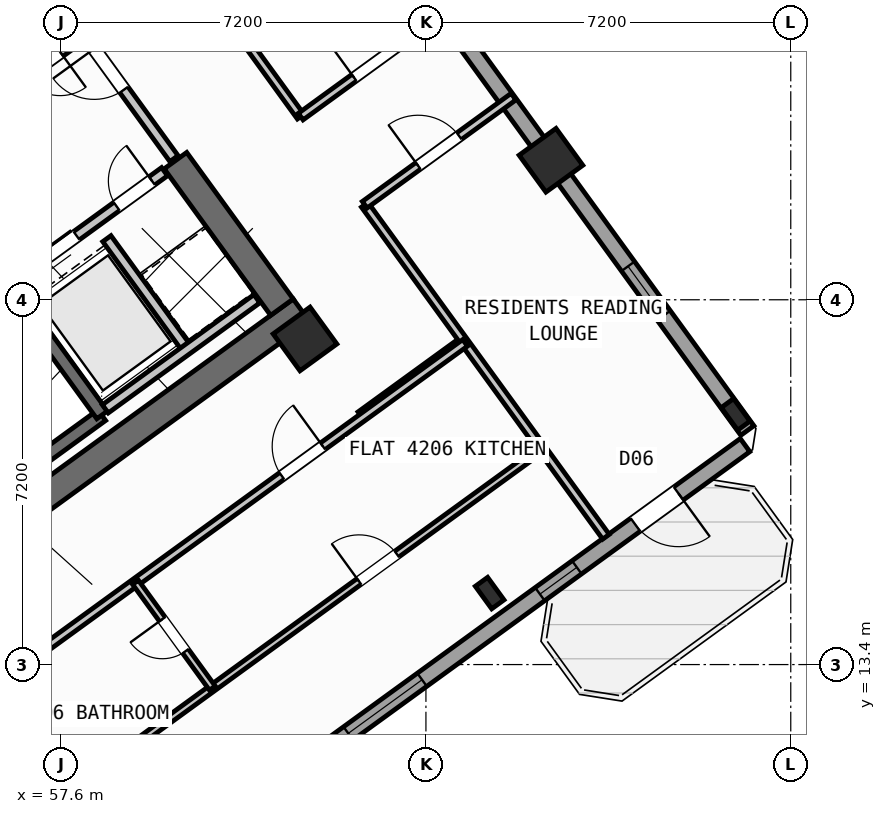
"""IFC4 building model, lengths in metres.
Left out: names, types, materials, properties, quantities, classifications, styles, units other than length and angle.
Written with IfcOpenShell. Run it as: python <this file> out.ifc"""

import sys

from ifc_helpers import new_model, si_unit, direction, frame, frame_2d, origin, origin_2d, place, context, subcontext, project, spatial, rectangle, hollow_rectangle, i_section, extrude, source, transform, mapped, element, fill, save


model = new_model("IFC4")
c1 = context("Model", 3, precision=1e-05, world=origin(), true_north=direction((0.0, 1.0)))
c2 = subcontext(c1, "Body", "Model", "MODEL_VIEW")
j1 = project(units=[si_unit("LENGTHUNIT", "METRE"), si_unit("PLANEANGLEUNIT", "RADIAN")], contexts=[c1])
p1 = place(None, origin())
s1 = spatial("IfcSite", under=j1, at=p1, CompositionType="ELEMENT")
p2 = place(p1, origin())
s2 = spatial("IfcBuilding", under=s1, at=p2, CompositionType="ELEMENT")
p3 = place(p2, frame((0.0, 0.0, 165.9)))
s3 = spatial("IfcBuildingStorey", under=s2, at=p3, CompositionType="ELEMENT", Elevation=165.9)
p4 = place(p3, frame((52.359, 13.14, 0.0), z_axis=(0.0, 0.0, 1.0), x_axis=(0.809014896919, 0.587788139183, 0.0)))
e1 = element("IfcWall", 1, at=p4, inside=s3, PredefinedType="SHEAR", context=c2, shape_type="SweptSolid", body=[
    extrude(rectangle(XDim=12.34, YDim=0.55, at=frame_2d((6.17, 0.0))), origin(), (0.0, 0.0, 1.0), 3.32),
])
p5 = place(p3, frame((61.958, 20.454, 0.0), z_axis=(0.0, 0.0, 1.0), x_axis=(-0.587802113096, 0.809004744015, 0.0)))
e2 = element("IfcWall", 2, at=p5, inside=s3, PredefinedType="SHEAR", context=c2, shape_type="SweptSolid", body=[
    extrude(rectangle(XDim=3.575, YDim=0.55, at=frame_2d((1.788, 0.0))), origin(), (0.0, 0.0, 1.0), 3.32),
])
m1 = source(origin(), c2, "Body", "SweptSolid", [
    extrude(i_section(OverallWidth=0.3, OverallDepth=0.55, WebThickness=0.015, FlangeThickness=0.029, at=origin_2d()), origin(), (0.0, 0.0, 1.0), 3.6),
])
p6 = place(p3, frame((66.058, 14.811, 0.0), z_axis=(0.0, 0.0, 1.0), x_axis=(0.809016994375, 0.587785252292, 0.0)))
e3 = element("IfcColumn", 3, at=p6, inside=s3, PredefinedType="COLUMN", context=c2, shape_type="MappedRepresentation", body=[
    mapped(m1, transform((0.0, 0.0, 0.0), scale=1.0)),
])
m2 = source(origin(), c2, "Body", "SweptSolid", [
    extrude(hollow_rectangle(XDim=0.9, YDim=0.9, WallThickness=0.036, at=origin_2d()), origin(), (0.0, 0.0, 1.0), 3.6),
])
p7 = place(p3, frame((62.414, 19.827, 0.0), z_axis=(0.0, 0.0, 1.0), x_axis=(0.809016994375, 0.587785252292, 0.0)))
e4 = element("IfcColumn", 4, at=p7, inside=s3, PredefinedType="COLUMN", context=c2, shape_type="MappedRepresentation", body=[
    mapped(m2, transform((0.0, 0.0, 0.0), scale=1.0)),
])
p8 = place(p3, frame((70.912, 18.338, 0.0), z_axis=(0.0, 0.0, 1.0), x_axis=(0.809016994375, 0.587785252292, 0.0)))
e5 = element("IfcColumn", 5, at=p8, inside=s3, PredefinedType="COLUMN", context=c2, shape_type="MappedRepresentation", body=[
    mapped(m1, transform((0.0, 0.0, 0.0), scale=1.0)),
])
p9 = place(p3, frame((67.268, 23.354, 0.0), z_axis=(0.0, 0.0, 1.0), x_axis=(0.809016994375, 0.587785252292, 0.0)))
e6 = element("IfcColumn", 6, at=p9, inside=s3, PredefinedType="COLUMN", context=c2, shape_type="MappedRepresentation", body=[
    mapped(m2, transform((0.0, 0.0, 0.0), scale=1.0)),
])
p10 = place(p3, frame((43.938, 25.192, 0.0), z_axis=(0.0, 0.0, 1.0), x_axis=(0.809016324578, 0.587786174187, 0.0)))
e7 = element("IfcWall", 7, at=p10, inside=s3, PredefinedType="STANDARD", context=c2, shape_type="SweptSolid", body=[
    extrude(rectangle(XDim=17.587, YDim=0.32, at=frame_2d((8.794, 0.0))), origin(), (0.0, 0.0, 1.0), 3.32),
])
p11 = place(p10, frame((14.914, 0.0, 0.0)))
e8 = element("IfcOpeningElement", 8, at=p11, cuts=e7, PredefinedType="OPENING", context=c2, shape_type="SweptSolid", body=[
    extrude(rectangle(XDim=1.05, YDim=2.15, at=frame_2d((0.525, 1.075))), frame((0.0, 0.17, 0.0), z_axis=(0.0, -1.0, 0.0), x_axis=(1.0, 0.0, 0.0)), (0.0, 0.0, 1.0), 0.34),
])
p12 = place(p10, frame((2.144, 0.0, 0.8)))
e9 = element("IfcOpeningElement", 9, at=p12, cuts=e7, PredefinedType="OPENING", context=c2, shape_type="SweptSolid", body=[
    extrude(rectangle(XDim=2.1, YDim=1.55, at=frame_2d((1.05, 0.775))), frame((0.0, 0.17, 0.0), z_axis=(0.0, -1.0, 0.0), x_axis=(1.0, 0.0, 0.0)), (0.0, 0.0, 1.0), 0.34),
])
p13 = place(p10, frame((7.344, 0.0, 0.8)))
e10 = element("IfcOpeningElement", 10, at=p13, cuts=e7, PredefinedType="OPENING", context=c2, shape_type="SweptSolid", body=[
    extrude(rectangle(XDim=2.1, YDim=1.55, at=frame_2d((1.05, 0.775))), frame((0.0, 0.17, 0.0), z_axis=(0.0, -1.0, 0.0), x_axis=(1.0, 0.0, 0.0)), (0.0, 0.0, 1.0), 0.34),
])
p14 = place(p3, frame((58.455, 35.484, 0.0), z_axis=(0.0, 0.0, 1.0), x_axis=(0.587783625747, -0.809018176127, 0.0)))
e11 = element("IfcWall", 11, at=p14, inside=s3, PredefinedType="STANDARD", context=c2, shape_type="SweptSolid", body=[
    extrude(rectangle(XDim=21.587, YDim=0.32, at=frame_2d((10.794, 0.0))), origin(), (0.0, 0.0, 1.0), 2.795),
])
p15 = place(p14, frame((1.475, 0.0, 0.8)))
e12 = element("IfcOpeningElement", 12, at=p15, cuts=e11, PredefinedType="OPENING", context=c2, shape_type="SweptSolid", body=[
    extrude(rectangle(XDim=2.1, YDim=1.55, at=frame_2d((1.05, 0.775))), frame((0.0, 0.17, 0.0), z_axis=(0.0, -1.0, 0.0), x_axis=(1.0, 0.0, 0.0)), (0.0, 0.0, 1.0), 0.34),
])
p16 = place(p14, frame((5.13, 0.0, 0.85)))
e13 = element("IfcOpeningElement", 13, at=p16, cuts=e11, PredefinedType="OPENING", context=c2, shape_type="SweptSolid", body=[
    extrude(rectangle(XDim=1.5, YDim=1.5, at=frame_2d((0.75, 0.75))), frame((0.0, 0.17, 0.0), z_axis=(0.0, -1.0, 0.0), x_axis=(1.0, 0.0, 0.0)), (0.0, 0.0, 1.0), 0.34),
])
p17 = place(p14, frame((8.929, 0.0, 0.85)))
e14 = element("IfcOpeningElement", 14, at=p17, cuts=e11, PredefinedType="OPENING", context=c2, shape_type="SweptSolid", body=[
    extrude(rectangle(XDim=1.5, YDim=1.5, at=frame_2d((0.75, 0.75))), frame((0.0, 0.17, 0.0), z_axis=(0.0, -1.0, 0.0), x_axis=(1.0, 0.0, 0.0)), (0.0, 0.0, 1.0), 0.34),
])
p18 = place(p14, frame((17.581, 0.0, 0.95)))
e15 = element("IfcOpeningElement", 15, at=p18, cuts=e11, PredefinedType="OPENING", context=c2, shape_type="SweptSolid", body=[
    extrude(rectangle(XDim=1.2, YDim=1.4, at=frame_2d((0.6, 0.7))), frame((0.0, 0.17, 0.0), z_axis=(0.0, -1.0, 0.0), x_axis=(1.0, 0.0, 0.0)), (0.0, 0.0, 1.0), 0.34),
])
p19 = place(p3, frame((71.098, 17.731, 0.0), z_axis=(0.0, 0.0, 1.0), x_axis=(-0.809021120468, -0.587779573171, 0.0)))
e16 = element("IfcWall", 16, at=p19, inside=s3, PredefinedType="STANDARD", context=c2, shape_type="SweptSolid", body=[
    extrude(rectangle(XDim=17.588, YDim=0.32, at=frame_2d((8.794, 0.0))), origin(), (0.0, 0.0, 1.0), 3.32),
])
p20 = place(p19, frame((1.624, 0.0, 0.0)))
e17 = element("IfcOpeningElement", 17, at=p20, cuts=e16, PredefinedType="OPENING", context=c2, shape_type="SweptSolid", body=[
    extrude(rectangle(XDim=1.05, YDim=2.15, at=frame_2d((0.525, 1.075))), frame((0.0, 0.17, 0.0), z_axis=(0.0, -1.0, 0.0), x_axis=(1.0, 0.0, 0.0)), (0.0, 0.0, 1.0), 0.34),
])
p21 = place(p19, frame((4.104, 0.0, 1.0)))
e18 = element("IfcOpeningElement", 18, at=p21, cuts=e16, PredefinedType="OPENING", context=c2, shape_type="SweptSolid", body=[
    extrude(rectangle(XDim=0.9, YDim=1.25, at=frame_2d((0.45, 0.625))), frame((0.0, 0.17, 0.0), z_axis=(0.0, -1.0, 0.0), x_axis=(1.0, 0.0, 0.0)), (0.0, 0.0, 1.0), 0.34),
])
p22 = place(p19, frame((7.879, 0.0, 0.85)))
e19 = element("IfcOpeningElement", 19, at=p22, cuts=e16, PredefinedType="OPENING", context=c2, shape_type="SweptSolid", body=[
    extrude(rectangle(XDim=1.8, YDim=1.5, at=frame_2d((0.9, 0.75))), frame((0.0, 0.17, 0.0), z_axis=(0.0, -1.0, 0.0), x_axis=(1.0, 0.0, 0.0)), (0.0, 0.0, 1.0), 0.34),
])
p23 = place(p19, frame((12.849, 0.0, 0.85)))
e20 = element("IfcOpeningElement", 20, at=p23, cuts=e16, PredefinedType="OPENING", context=c2, shape_type="SweptSolid", body=[
    extrude(rectangle(XDim=1.8, YDim=1.5, at=frame_2d((0.9, 0.75))), frame((0.0, 0.17, 0.0), z_axis=(0.0, -1.0, 0.0), x_axis=(1.0, 0.0, 0.0)), (0.0, 0.0, 1.0), 0.34),
])
p24 = place(p3, frame((52.472, 14.013, 0.0), z_axis=(0.0, 0.0, 1.0), x_axis=(0.809028366311, 0.587769599847, 0.0)))
e21 = element("IfcWall", 21, at=p24, inside=s3, PredefinedType="SHEAR", context=c2, shape_type="SweptSolid", body=[
    extrude(rectangle(XDim=7.33, YDim=0.26, at=frame_2d((3.665, 0.0))), origin(), (0.0, 0.0, 1.0), 3.32),
])
p25 = place(p3, frame((58.41, 18.327, 0.0), z_axis=(0.0, 0.0, 1.0), x_axis=(-0.58776738483, 0.809029975545, 0.0)))
e22 = element("IfcWall", 22, at=p25, inside=s3, PredefinedType="SHEAR", context=c2, shape_type="SweptSolid", body=[
    extrude(rectangle(XDim=3.16, YDim=0.26, at=frame_2d((1.58, 0.0))), origin(), (0.0, 0.0, 1.0), 3.32),
])
p26 = place(p3, frame((56.553, 20.884, 0.0), z_axis=(0.0, 0.0, 1.0), x_axis=(0.809023564264, 0.58777620951, 0.0)))
e23 = element("IfcWall", 23, at=p26, inside=s3, PredefinedType="STANDARD", context=c2, shape_type="SweptSolid", body=[
    extrude(rectangle(XDim=3.818, YDim=0.2, at=frame_2d((1.909, 0.0))), origin(), (0.0, 0.0, 1.0), 3.31),
])
p27 = place(p26, frame((0.57, 0.0, 0.0)))
e24 = element("IfcOpeningElement", 24, at=p27, cuts=e23, PredefinedType="OPENING", context=c2, shape_type="SweptSolid", body=[
    extrude(rectangle(XDim=1.1, YDim=2.15, at=frame_2d((0.55, 1.075))), frame((0.0, 0.11, 0.0), z_axis=(0.0, -1.0, 0.0), x_axis=(1.0, 0.0, 0.0)), (0.0, 0.0, 1.0), 0.22),
])
p28 = place(p26, frame((2.65, 0.0, 0.0)))
e25 = element("IfcOpeningElement", 25, at=p28, cuts=e23, PredefinedType="OPENING", context=c2, shape_type="SweptSolid", body=[
    extrude(rectangle(XDim=0.86, YDim=2.05, at=frame_2d((0.43, 1.025))), frame((0.0, 0.11, 0.0), z_axis=(0.0, -1.0, 0.0), x_axis=(1.0, 0.0, 0.0)), (0.0, 0.0, 1.0), 0.22),
])
p29 = place(p3, frame((60.067, 19.655, 0.0), z_axis=(0.0, 0.0, 1.0), x_axis=(-0.587800520745, 0.809005900975, 0.0)))
e26 = element("IfcWall", 26, at=p29, inside=s3, PredefinedType="STANDARD", context=c2, shape_type="SweptSolid", body=[
    extrude(rectangle(XDim=2.66, YDim=0.2, at=frame_2d((1.33, 0.0))), origin(), (0.0, 0.0, 1.0), 3.31),
])
p30 = place(p3, frame((58.472, 18.447, 0.0), z_axis=(0.0, 0.0, 1.0), x_axis=(0.809018631237, 0.587782999339, 0.0)))
e27 = element("IfcWall", 27, at=p30, inside=s3, PredefinedType="STANDARD", context=c2, shape_type="SweptSolid", body=[
    extrude(rectangle(XDim=3.698, YDim=0.2, at=frame_2d((1.849, 0.0))), origin(), (0.0, 0.0, 1.0), 3.31),
])
p31 = place(p3, frame((53.425, 22.468, 0.0), z_axis=(0.0, 0.0, 1.0), x_axis=(0.809024377198, 0.587775090574, 0.0)))
e28 = element("IfcWall", 28, at=p31, inside=s3, PredefinedType="STANDARD", context=c2, shape_type="SweptSolid", body=[
    extrude(rectangle(XDim=5.418, YDim=0.2, at=frame_2d((2.709, 0.0))), origin(), (0.0, 0.0, 1.0), 3.31),
])
p32 = place(p31, frame((4.28, 0.0, 0.0)))
e29 = element("IfcOpeningElement", 29, at=p32, cuts=e28, PredefinedType="OPENING", context=c2, shape_type="SweptSolid", body=[
    extrude(rectangle(XDim=0.86, YDim=2.05, at=frame_2d((0.43, 1.025))), frame((0.0, 0.11, 0.0), z_axis=(0.0, -1.0, 0.0), x_axis=(1.0, 0.0, 0.0)), (0.0, 0.0, 1.0), 0.22),
])
p33 = place(p31, frame((1.45, 0.0, 0.0)))
e30 = element("IfcOpeningElement", 30, at=p33, cuts=e28, PredefinedType="OPENING", context=c2, shape_type="SweptSolid", body=[
    extrude(rectangle(XDim=0.86, YDim=2.05, at=frame_2d((0.43, 1.025))), frame((0.0, 0.11, 0.0), z_axis=(0.0, -1.0, 0.0), x_axis=(1.0, 0.0, 0.0)), (0.0, 0.0, 1.0), 0.22),
])
p34 = place(p3, frame((59.827, 23.386, 0.0), z_axis=(0.0, 0.0, 1.0), x_axis=(-0.587803840107, 0.809003489211, 0.0)))
e31 = element("IfcWall", 31, at=p34, inside=s3, PredefinedType="STANDARD", context=c2, shape_type="SweptSolid", body=[
    extrude(rectangle(XDim=2.96, YDim=0.2, at=frame_2d((1.48, 0.0))), origin(), (0.0, 0.0, 1.0), 3.31),
])
p35 = place(p34, frame((1.68, 0.0, 0.0)))
e32 = element("IfcOpeningElement", 32, at=p35, cuts=e31, PredefinedType="OPENING", context=c2, shape_type="SweptSolid", body=[
    extrude(rectangle(XDim=1.0, YDim=2.1, at=frame_2d((0.5, 1.05))), frame((0.0, 0.11, 0.0), z_axis=(0.0, -1.0, 0.0), x_axis=(1.0, 0.0, 0.0)), (0.0, 0.0, 1.0), 0.22),
])
p36 = place(p3, frame((63.507, 18.322, 0.0), z_axis=(0.0, 0.0, 1.0), x_axis=(0.809034604122, 0.587761013791, 0.0)))
e33 = element("IfcWall", 33, at=p36, inside=s3, PredefinedType="PARTITIONING", context=c2, shape_type="SweptSolid", body=[
    extrude(rectangle(XDim=2.51, YDim=0.16, at=frame_2d((1.255, 0.0))), origin(), (0.0, 0.0, 1.0), 3.31),
])
p37 = place(p3, frame((68.353, 15.922, 0.0), z_axis=(0.0, 0.0, 1.0), x_axis=(-0.58776839458, 0.809029241952, 0.0)))
e34 = element("IfcWall", 34, at=p37, inside=s3, PredefinedType="PARTITIONING", context=c2, shape_type="SweptSolid", body=[
    extrude(rectangle(XDim=8.1, YDim=0.16, at=frame_2d((4.05, 0.0))), origin(), (0.0, 0.0, 1.0), 3.31),
])
p38 = place(p3, frame((62.328, 24.215, 0.0), z_axis=(0.0, 0.0, 1.0), x_axis=(-0.587778600963, 0.809021826807, 0.0)))
e35 = element("IfcWall", 35, at=p38, inside=s3, PredefinedType="PARTITIONING", context=c2, shape_type="SweptSolid", body=[
    extrude(rectangle(XDim=11.45, YDim=0.16, at=frame_2d((5.725, 0.0))), origin(), (0.0, 0.0, 1.0), 3.31),
])
p39 = place(p3, frame((63.592, 22.475, 0.0), z_axis=(0.0, 0.0, 1.0), x_axis=(0.809035546126, 0.58775971715, 0.0)))
e36 = element("IfcWall", 36, at=p39, inside=s3, PredefinedType="PARTITIONING", context=c2, shape_type="SweptSolid", body=[
    extrude(rectangle(XDim=3.63, YDim=0.16, at=frame_2d((1.815, 0.0))), origin(), (0.0, 0.0, 1.0), 3.31),
])
p40 = place(p39, frame((1.305, 0.0, 0.0)))
e37 = element("IfcOpeningElement", 37, at=p40, cuts=e36, PredefinedType="OPENING", context=c2, shape_type="SweptSolid", body=[
    extrude(rectangle(XDim=1.0, YDim=2.1, at=frame_2d((0.5, 1.05))), frame((0.0, 0.09, 0.0), z_axis=(0.0, -1.0, 0.0), x_axis=(1.0, 0.0, 0.0)), (0.0, 0.0, 1.0), 0.18),
])
p41 = place(p3, frame((62.328, 24.215, 0.0), z_axis=(0.0, 0.0, 1.0), x_axis=(0.809003564202, 0.587803736896, 0.0)))
e38 = element("IfcWall", 38, at=p41, inside=s3, PredefinedType="PARTITIONING", context=c2, shape_type="SweptSolid", body=[
    extrude(rectangle(XDim=3.63, YDim=0.16, at=frame_2d((1.815, 0.0))), origin(), (0.0, 0.0, 1.0), 3.31),
])
p42 = place(p41, frame((1.305, 0.0, 0.0)))
e39 = element("IfcOpeningElement", 39, at=p42, cuts=e38, PredefinedType="OPENING", context=c2, shape_type="SweptSolid", body=[
    extrude(rectangle(XDim=1.0, YDim=2.1, at=frame_2d((0.5, 1.05))), frame((0.0, 0.09, 0.0), z_axis=(0.0, -1.0, 0.0), x_axis=(1.0, 0.0, 0.0)), (0.0, 0.0, 1.0), 0.18),
])
p43 = place(p3, frame((53.705, 11.126, 0.0), z_axis=(0.0, 0.0, 1.0), x_axis=(0.809014504436, 0.587788679384, 0.0)))
e40 = element("IfcWall", 40, at=p43, inside=s3, PredefinedType="PARTITIONING", context=c2, shape_type="SweptSolid", body=[
    extrude(rectangle(XDim=14.67, YDim=0.16, at=frame_2d((7.335, 0.0))), origin(), (0.0, 0.0, 1.0), 3.31),
])
p44 = place(p43, frame((10.2, 0.0, 0.0)))
e41 = element("IfcOpeningElement", 41, at=p44, cuts=e40, PredefinedType="OPENING", context=c2, shape_type="SweptSolid", body=[
    extrude(rectangle(XDim=1.0, YDim=2.1, at=frame_2d((0.5, 1.05))), frame((0.0, 0.09, 0.0), z_axis=(0.0, -1.0, 0.0), x_axis=(1.0, 0.0, 0.0)), (0.0, 0.0, 1.0), 0.18),
])
p45 = place(p3, frame((57.747, 7.586, 0.0), z_axis=(0.0, 0.0, 1.0), x_axis=(-0.587784893399, 0.809017255126, 0.0)))
e42 = element("IfcWall", 42, at=p45, inside=s3, PredefinedType="PARTITIONING", context=c2, shape_type="SweptSolid", body=[
    extrude(rectangle(XDim=5.48, YDim=0.16, at=frame_2d((2.74, 0.0))), origin(), (0.0, 0.0, 1.0), 3.31),
])
p46 = place(p3, frame((56.249, 9.785, 0.0), z_axis=(0.0, 0.0, 1.0), x_axis=(0.809011747655, 0.587792473715, 0.0)))
e43 = element("IfcWall", 43, at=p46, inside=s3, PredefinedType="PLUMBINGWALL", context=c2, shape_type="SweptSolid", body=[
    extrude(rectangle(XDim=13.4, YDim=0.14, at=frame_2d((6.7, 0.0))), origin(), (0.0, 0.0, 1.0), 3.31),
])
p47 = place(p46, frame((8.94, 0.0, 0.0)))
e44 = element("IfcOpeningElement", 44, at=p47, cuts=e43, PredefinedType="OPENING", context=c2, shape_type="SweptSolid", body=[
    extrude(rectangle(XDim=0.92, YDim=2.08, at=frame_2d((0.46, 1.04))), frame((0.0, 0.08, 0.0), z_axis=(0.0, -1.0, 0.0), x_axis=(1.0, 0.0, 0.0)), (0.0, 0.0, 1.0), 0.16),
])
p48 = place(p3, frame((60.585, 12.936, 0.0), z_axis=(0.0, 0.0, 1.0), x_axis=(-0.587772116736, 0.809026537752, 0.0)))
e45 = element("IfcWall", 45, at=p48, inside=s3, PredefinedType="PLUMBINGWALL", context=c2, shape_type="SweptSolid", body=[
    extrude(rectangle(XDim=2.58, YDim=0.14, at=frame_2d((1.29, 0.0))), origin(), (0.0, 0.0, 1.0), 3.31),
])
p49 = place(p48, frame((0.9, 0.0, 0.0)))
e46 = element("IfcOpeningElement", 46, at=p49, cuts=e45, PredefinedType="OPENING", context=c2, shape_type="SweptSolid", body=[
    extrude(rectangle(XDim=0.78, YDim=2.05, at=frame_2d((0.39, 1.025))), frame((0.0, 0.08, 0.0), z_axis=(0.0, -1.0, 0.0), x_axis=(1.0, 0.0, 0.0)), (0.0, 0.0, 1.0), 0.16),
])
m3 = source(origin(), c2, "Body", "SweptSolid", [
    extrude(rectangle(XDim=1.05, YDim=2.15, at=frame_2d((0.525, 1.075))), frame((0.0, 0.025, 0.0), z_axis=(0.0, -1.0, 0.0), x_axis=(1.0, 0.0, 0.0)), (0.0, 0.0, 1.0), 0.05),
])
p50 = place(p20, origin())
e47 = element("IfcDoor", 47, at=p50, inside=s3, OperationType="SINGLE_SWING_LEFT", PredefinedType="DOOR", context=c2, shape_type="MappedRepresentation", body=[
    mapped(m3, transform((0.0, 0.0, 0.0), scale=1.0)),
])
fill(e17, e47)
m4 = source(origin(), c2, "Body", "SweptSolid", [
    extrude(rectangle(XDim=1.2, YDim=1.4, at=frame_2d((0.6, 0.7))), frame((0.0, 0.03, 0.0), z_axis=(0.0, -1.0, 0.0), x_axis=(1.0, 0.0, 0.0)), (0.0, 0.0, 1.0), 0.06),
])
p51 = place(p18, origin())
e48 = element("IfcWindow", 48, at=p51, inside=s3, PartitioningType="SINGLE_PANEL", PredefinedType="WINDOW", context=c2, shape_type="MappedRepresentation", body=[
    mapped(m4, transform((0.0, 0.0, 0.0), scale=1.0)),
])
fill(e15, e48)
m5 = source(origin(), c2, "Body", "SweptSolid", [
    extrude(rectangle(XDim=0.9, YDim=1.25, at=frame_2d((0.45, 0.625))), frame((0.0, 0.03, 0.0), z_axis=(0.0, -1.0, 0.0), x_axis=(1.0, 0.0, 0.0)), (0.0, 0.0, 1.0), 0.06),
])
p52 = place(p21, origin())
e49 = element("IfcWindow", 49, at=p52, inside=s3, PartitioningType="SINGLE_PANEL", PredefinedType="WINDOW", context=c2, shape_type="MappedRepresentation", body=[
    mapped(m5, transform((0.0, 0.0, 0.0), scale=1.0)),
])
fill(e18, e49)
m6 = source(origin(), c2, "Body", "SweptSolid", [
    extrude(rectangle(XDim=1.8, YDim=1.5, at=frame_2d((0.9, 0.75))), frame((0.0, 0.03, 0.0), z_axis=(0.0, -1.0, 0.0), x_axis=(1.0, 0.0, 0.0)), (0.0, 0.0, 1.0), 0.06),
])
p53 = place(p22, origin())
e50 = element("IfcWindow", 50, at=p53, inside=s3, PartitioningType="SINGLE_PANEL", PredefinedType="WINDOW", context=c2, shape_type="MappedRepresentation", body=[
    mapped(m6, transform((0.0, 0.0, 0.0), scale=1.0)),
])
fill(e19, e50)
m7 = source(origin(), c2, "Body", "SweptSolid", [
    extrude(rectangle(XDim=1.1, YDim=2.15, at=frame_2d((0.55, 1.075))), frame((0.0, 0.025, 0.0), z_axis=(0.0, -1.0, 0.0), x_axis=(1.0, 0.0, 0.0)), (0.0, 0.0, 1.0), 0.05),
])
p54 = place(p27, origin())
e51 = element("IfcDoor", 51, at=p54, inside=s3, OperationType="DOUBLE_DOOR_SLIDING", PredefinedType="DOOR", context=c2, shape_type="MappedRepresentation", body=[
    mapped(m7, transform((0.0, 0.0, 0.0), scale=1.0)),
])
fill(e24, e51)
m8 = source(origin(), c2, "Body", "SweptSolid", [
    extrude(rectangle(XDim=0.86, YDim=2.05, at=frame_2d((0.43, 1.025))), frame((0.0, 0.025, 0.0), z_axis=(0.0, -1.0, 0.0), x_axis=(1.0, 0.0, 0.0)), (0.0, 0.0, 1.0), 0.05),
])
p55 = place(p28, origin())
e52 = element("IfcDoor", 52, at=p55, inside=s3, OperationType="SINGLE_SWING_RIGHT", PredefinedType="DOOR", context=c2, shape_type="MappedRepresentation", body=[
    mapped(m8, transform((0.0, 0.0, 0.0), scale=1.0)),
])
fill(e25, e52)
p56 = place(p32, frame((0.86, 0.0, 0.0), z_axis=(0.0, 0.0, 1.0), x_axis=(-1.0, 0.0, 0.0)))
e53 = element("IfcDoor", 53, at=p56, inside=s3, OperationType="SINGLE_SWING_LEFT", PredefinedType="DOOR", context=c2, shape_type="MappedRepresentation", body=[
    mapped(m8, transform((0.0, 0.0, 0.0), scale=1.0)),
])
fill(e29, e53)
m9 = source(origin(), c2, "Body", "SweptSolid", [
    extrude(rectangle(XDim=1.0, YDim=2.1, at=frame_2d((0.5, 1.05))), frame((0.0, 0.025, 0.0), z_axis=(0.0, -1.0, 0.0), x_axis=(1.0, 0.0, 0.0)), (0.0, 0.0, 1.0), 0.05),
])
p57 = place(p35, origin())
e54 = element("IfcDoor", 54, at=p57, inside=s3, OperationType="SINGLE_SWING_RIGHT", PredefinedType="DOOR", context=c2, shape_type="MappedRepresentation", body=[
    mapped(m9, transform((0.0, 0.0, 0.0), scale=1.0)),
])
fill(e32, e54)
p58 = place(p42, origin())
e55 = element("IfcDoor", 55, at=p58, inside=s3, OperationType="SINGLE_SWING_LEFT", PredefinedType="DOOR", context=c2, shape_type="MappedRepresentation", body=[
    mapped(m9, transform((0.0, 0.0, 0.0), scale=1.0)),
])
fill(e39, e55)
p59 = place(p40, origin())
e56 = element("IfcDoor", 56, at=p59, inside=s3, OperationType="SINGLE_SWING_LEFT", PredefinedType="DOOR", context=c2, shape_type="MappedRepresentation", body=[
    mapped(m9, transform((0.0, 0.0, 0.0), scale=1.0)),
])
fill(e37, e56)
p60 = place(p44, origin())
e57 = element("IfcDoor", 57, at=p60, inside=s3, OperationType="SINGLE_SWING_RIGHT", PredefinedType="DOOR", context=c2, shape_type="MappedRepresentation", body=[
    mapped(m9, transform((0.0, 0.0, 0.0), scale=1.0)),
])
fill(e41, e57)
m10 = source(origin(), c2, "Body", "SweptSolid", [
    extrude(rectangle(XDim=0.92, YDim=2.08, at=frame_2d((0.46, 1.04))), frame((0.0, 0.025, 0.0), z_axis=(0.0, -1.0, 0.0), x_axis=(1.0, 0.0, 0.0)), (0.0, 0.0, 1.0), 0.05),
])
p61 = place(p47, origin())
e58 = element("IfcDoor", 58, at=p61, inside=s3, OperationType="SINGLE_SWING_LEFT", PredefinedType="DOOR", context=c2, shape_type="MappedRepresentation", body=[
    mapped(m10, transform((0.0, 0.0, 0.0), scale=1.0)),
])
fill(e44, e58)
m11 = source(origin(), c2, "Body", "SweptSolid", [
    extrude(rectangle(XDim=0.78, YDim=2.05, at=frame_2d((0.39, 1.025))), frame((0.0, 0.025, 0.0), z_axis=(0.0, -1.0, 0.0), x_axis=(1.0, 0.0, 0.0)), (0.0, 0.0, 1.0), 0.05),
])
p62 = place(p49, origin())
e59 = element("IfcDoor", 59, at=p62, inside=s3, OperationType="SINGLE_SWING_RIGHT", PredefinedType="DOOR", context=c2, shape_type="MappedRepresentation", body=[
    mapped(m11, transform((0.0, 0.0, 0.0), scale=1.0)),
])
fill(e46, e59)
save(model, sys.argv[1])
